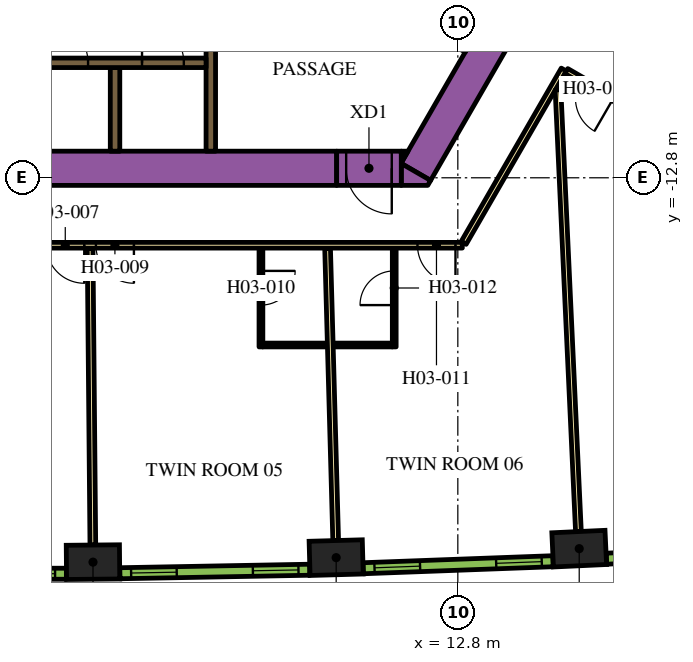
"""IFC4 building model, lengths in metres.
Left out: names, types, materials, properties, quantities, classifications, styles, units other than length and angle.
Written with IfcOpenShell. Run it as: python <this file> out.ifc"""

import sys

from ifc_helpers import new_model, si_unit, direction, frame, frame_2d, origin, origin_2d, place, context, subcontext, project, spatial, polyline, rectangle, outline, extrude, element, fill, save


model = new_model("IFC4")
c1 = context("Model", 3, precision=1e-05, world=origin(), true_north=direction((0.0, 1.0)))
c2 = subcontext(c1, "Body", "Model", "MODEL_VIEW")
j1 = project(units=[si_unit("LENGTHUNIT", "METRE"), si_unit("PLANEANGLEUNIT", "RADIAN")], contexts=[c1])
p1 = place(None, origin())
s1 = spatial("IfcSite", under=j1, at=p1, CompositionType="ELEMENT")
p2 = place(p1, origin())
s2 = spatial("IfcBuilding", under=s1, at=p2, CompositionType="ELEMENT")
p3 = place(p2, frame((0.0, 0.0, 54.9)))
s3 = spatial("IfcBuildingStorey", under=s2, at=p3, CompositionType="ELEMENT", Elevation=54.9)
for number, where, z_axis, x_axis in (
    (1, (3.2, -22.913, 0.0), (0.0, 0.0, 1.0), (1.0, 0.009, 0.0)),
    (2, (9.599, -22.795, 0.0), (0.0, 0.0, 1.0), (1.0, 0.028, 0.0)),
    (3, (15.994, -22.558, 0.0), (0.0, 0.0, 1.0), (0.999, 0.046, 0.0)),
):
    element("IfcColumn", number, at=place(p3, frame(where, z_axis=z_axis, x_axis=x_axis)), inside=s3, PredefinedType="COLUMN", context=c2, shape_type="SweptSolid", body=[
        extrude(rectangle(XDim=1.4, YDim=0.9, at=origin_2d()), origin(), (0.0, 0.0, 1.0), 3.9),
    ])
p4 = place(p3, frame((11.695, -12.644, 0.0), z_axis=(0.0, 0.0, 1.0), x_axis=(0.500010229568, 0.86601949766, 0.0)))
e4 = element("IfcWall", 4, at=p4, inside=s3, PredefinedType="SOLIDWALL", context=c2, shape_type="SweptSolid", body=[
    extrude(rectangle(XDim=9.326, YDim=0.9, at=frame_2d((4.663, 0.0))), origin(), (0.0, 0.0, 1.0), 3.9),
])
p5 = place(p3, origin())
e5 = element("IfcWall", 5, at=p5, inside=s3, PredefinedType="SOLIDWALL", context=c2, shape_type="SweptSolid", body=[
    extrude(outline(polyline([(12.009, -13.0), (11.312, -13.0), (11.312, -12.425), (12.083, -12.871), (12.009, -13.0)])), origin(), (0.0, 0.0, 1.0), 3.9),
])
e6 = element("IfcWall", 6, at=p5, inside=s3, PredefinedType="SOLIDWALL", context=c2, shape_type="SweptSolid", body=[
    extrude(outline(polyline([(11.489, -12.1), (11.312, -12.407), (11.312, -12.1), (11.489, -12.1)])), origin(), (0.0, 0.0, 1.0), 3.9),
])
p6 = place(p3, frame((-12.019, -12.55, 0.0), z_axis=(0.0, 0.0, 1.0), x_axis=(1.0, 0.0, 0.0)))
e7 = element("IfcWall", 7, at=p6, inside=s3, PredefinedType="SOLIDWALL", context=c2, shape_type="SweptSolid", body=[
    extrude(rectangle(XDim=21.63, YDim=0.9, at=frame_2d((10.815, 0.0))), origin(), (0.0, 0.0, 1.0), 3.9),
])
p7 = place(p3, frame((6.3, -8.67, 0.0), z_axis=(0.0, 0.0, 1.0), x_axis=(0.0, -1.0, 0.0)))
e8 = element("IfcWall", 8, at=p7, inside=s3, PredefinedType="SOLIDWALL", context=c2, shape_type="SweptSolid", body=[
    extrude(rectangle(XDim=3.43, YDim=0.25, at=frame_2d((1.715, 0.0))), origin(), (0.0, 0.0, 1.0), 3.9),
])
p8 = place(p3, frame((3.78, -12.1, 0.0), z_axis=(0.0, 0.0, 1.0), x_axis=(0.0, 1.0, 0.0)))
e9 = element("IfcWall", 9, at=p8, inside=s3, PredefinedType="SOLIDWALL", context=c2, shape_type="SweptSolid", body=[
    extrude(rectangle(XDim=2.2, YDim=0.25, at=frame_2d((1.1, 0.0))), origin(), (0.0, 0.0, 1.0), 3.9),
])
p9 = place(p3, frame((-6.175, -9.775, 0.0), z_axis=(0.0, 0.0, 1.0), x_axis=(1.0, 0.0, 0.0)))
e10 = element("IfcWall", 10, at=p9, inside=s3, PredefinedType="SOLIDWALL", context=c2, shape_type="SweptSolid", body=[
    extrude(rectangle(XDim=12.35, YDim=0.25, at=frame_2d((6.175, 0.0))), origin(), (0.0, 0.0, 1.0), 3.9),
])
p10 = place(p9, frame((0.585, 0.0, 0.0)))
e11 = element("IfcOpeningElement", 11, at=p10, cuts=e10, PredefinedType="OPENING", context=c2, shape_type="SweptSolid", body=[
    extrude(rectangle(XDim=1.1, YDim=2.1, at=frame_2d((0.55, 1.05))), frame((0.0, 0.135, 0.0), z_axis=(0.0, -1.0, 0.0), x_axis=(1.0, 0.0, 0.0)), (0.0, 0.0, 1.0), 0.27),
])
p11 = place(p9, frame((3.105, 0.0, 0.0)))
e12 = element("IfcOpeningElement", 12, at=p11, cuts=e10, PredefinedType="OPENING", context=c2, shape_type="SweptSolid", body=[
    extrude(rectangle(XDim=1.1, YDim=2.1, at=frame_2d((0.55, 1.05))), frame((0.0, 0.135, 0.0), z_axis=(0.0, -1.0, 0.0), x_axis=(1.0, 0.0, 0.0)), (0.0, 0.0, 1.0), 0.27),
])
p12 = place(p9, frame((5.625, 0.0, 0.0)))
e13 = element("IfcOpeningElement", 13, at=p12, cuts=e10, PredefinedType="OPENING", context=c2, shape_type="SweptSolid", body=[
    extrude(rectangle(XDim=1.1, YDim=2.1, at=frame_2d((0.55, 1.05))), frame((0.0, 0.135, 0.0), z_axis=(0.0, -1.0, 0.0), x_axis=(1.0, 0.0, 0.0)), (0.0, 0.0, 1.0), 0.27),
])
p13 = place(p9, frame((8.145, 0.0, 0.0)))
e14 = element("IfcOpeningElement", 14, at=p13, cuts=e10, PredefinedType="OPENING", context=c2, shape_type="SweptSolid", body=[
    extrude(rectangle(XDim=1.1, YDim=2.1, at=frame_2d((0.55, 1.05))), frame((0.0, 0.135, 0.0), z_axis=(0.0, -1.0, 0.0), x_axis=(1.0, 0.0, 0.0)), (0.0, 0.0, 1.0), 0.27),
])
p14 = place(p9, frame((10.665, 0.0, 0.0)))
e15 = element("IfcOpeningElement", 15, at=p14, cuts=e10, PredefinedType="OPENING", context=c2, shape_type="SweptSolid", body=[
    extrude(rectangle(XDim=1.1, YDim=2.1, at=frame_2d((0.55, 1.05))), frame((0.0, 0.135, 0.0), z_axis=(0.0, -1.0, 0.0), x_axis=(1.0, 0.0, 0.0)), (0.0, 0.0, 1.0), 0.27),
])
p15 = place(p3, frame((11.312, -12.55, 0.0), z_axis=(0.0, 0.0, 1.0), x_axis=(-1.0, 0.0, 0.0)))
e16 = element("IfcWall", 16, at=p15, inside=s3, PredefinedType="SOLIDWALL", context=c2, shape_type="SweptSolid", body=[
    extrude(rectangle(XDim=1.7, YDim=0.9, at=frame_2d((0.85, 0.0))), origin(), (0.0, 0.0, 1.0), 3.9),
])
p16 = place(p15, frame((0.25, 0.0, 0.0)))
e17 = element("IfcOpeningElement", 17, at=p16, cuts=e16, PredefinedType="OPENING", context=c2, shape_type="SweptSolid", body=[
    extrude(rectangle(XDim=1.2, YDim=2.1, at=frame_2d((0.6, 1.05))), frame((0.0, 0.46, 0.0), z_axis=(0.0, -1.0, 0.0), x_axis=(1.0, 0.0, 0.0)), (0.0, 0.0, 1.0), 0.92),
])
p17 = place(p3, frame((16.412, -8.523, 0.0), z_axis=(0.0, 0.0, 1.0), x_axis=(0.866022197818, -0.500005552856, 0.0)))
e18 = element("IfcWall", 18, at=p17, inside=s3, PredefinedType="PARTITIONING", context=c2, shape_type="SweptSolid", body=[
    extrude(rectangle(XDim=16.224, YDim=0.15, at=frame_2d((8.112, 0.0))), origin(), (0.0, 0.0, 1.0), 2.75),
])
p18 = place(p17, frame((7.949, 0.0, 0.0)))
e19 = element("IfcOpeningElement", 19, at=p18, cuts=e18, PredefinedType="OPENING", context=c2, shape_type="SweptSolid", body=[
    extrude(rectangle(XDim=1.0, YDim=2.1, at=frame_2d((0.5, 1.05))), frame((0.0, 0.085, 0.0), z_axis=(0.0, -1.0, 0.0), x_axis=(1.0, 0.0, 0.0)), (0.0, 0.0, 1.0), 0.17),
])
p19 = place(p17, frame((0.526, 0.0, 0.0)))
e20 = element("IfcOpeningElement", 20, at=p19, cuts=e18, PredefinedType="OPENING", context=c2, shape_type="SweptSolid", body=[
    extrude(rectangle(XDim=1.0, YDim=2.1, at=frame_2d((0.5, 1.05))), frame((0.0, 0.085, 0.0), z_axis=(0.0, -1.0, 0.0), x_axis=(1.0, 0.0, 0.0)), (0.0, 0.0, 1.0), 0.17),
])
p20 = place(p3, frame((12.918, -14.575, 0.0), z_axis=(0.0, 0.0, 1.0), x_axis=(-1.0, 0.0, 0.0)))
e21 = element("IfcWall", 21, at=p20, inside=s3, PredefinedType="PARTITIONING", context=c2, shape_type="SweptSolid", body=[
    extrude(rectangle(XDim=25.766, YDim=0.15, at=frame_2d((12.883, 0.0))), origin(), (0.0, 0.0, 1.0), 2.75),
])
p21 = place(p20, frame((24.586, 0.0, 0.0)))
e22 = element("IfcOpeningElement", 22, at=p21, cuts=e21, PredefinedType="OPENING", context=c2, shape_type="SweptSolid", body=[
    extrude(rectangle(XDim=1.0, YDim=2.1, at=frame_2d((0.5, 1.05))), frame((0.0, 0.085, 0.0), z_axis=(0.0, -1.0, 0.0), x_axis=(1.0, 0.0, 0.0)), (0.0, 0.0, 1.0), 0.17),
])
p22 = place(p20, frame((9.948, 0.0, 0.0)))
e23 = element("IfcOpeningElement", 23, at=p22, cuts=e21, PredefinedType="OPENING", context=c2, shape_type="SweptSolid", body=[
    extrude(rectangle(XDim=1.0, YDim=2.1, at=frame_2d((0.5, 1.05))), frame((0.0, 0.085, 0.0), z_axis=(0.0, -1.0, 0.0), x_axis=(1.0, 0.0, 0.0)), (0.0, 0.0, 1.0), 0.17),
])
p23 = place(p20, frame((8.642, 0.0, 0.0)))
e24 = element("IfcOpeningElement", 24, at=p23, cuts=e21, PredefinedType="OPENING", context=c2, shape_type="SweptSolid", body=[
    extrude(rectangle(XDim=1.0, YDim=2.1, at=frame_2d((0.5, 1.05))), frame((0.0, 0.085, 0.0), z_axis=(0.0, -1.0, 0.0), x_axis=(1.0, 0.0, 0.0)), (0.0, 0.0, 1.0), 0.17),
])
p24 = place(p20, frame((0.18, 0.0, 0.0)))
e25 = element("IfcOpeningElement", 25, at=p24, cuts=e21, PredefinedType="OPENING", context=c2, shape_type="SweptSolid", body=[
    extrude(rectangle(XDim=1.0, YDim=2.1, at=frame_2d((0.5, 1.05))), frame((0.0, 0.085, 0.0), z_axis=(0.0, -1.0, 0.0), x_axis=(1.0, 0.0, 0.0)), (0.0, 0.0, 1.0), 0.17),
])
p25 = place(p3, frame((15.587, -9.952, 0.0), z_axis=(0.0, 0.0, 1.0), x_axis=(-0.500016618951, -0.866015808616, 0.0)))
e26 = element("IfcWall", 26, at=p25, inside=s3, PredefinedType="PARTITIONING", context=c2, shape_type="SweptSolid", body=[
    extrude(rectangle(XDim=5.268, YDim=0.15, at=frame_2d((2.634, 0.0))), origin(), (0.0, 0.0, 1.0), 2.75),
])
p26 = place(p3, frame((29.638, -18.064, 0.0), z_axis=(0.0, 0.0, 1.0), x_axis=(-0.866026175601, 0.499998663172, 0.0)))
e27 = element("IfcWall", 27, at=p26, inside=s3, PredefinedType="PARTITIONING", context=c2, shape_type="SweptSolid", body=[
    extrude(rectangle(XDim=16.144, YDim=0.15, at=frame_2d((8.072, 0.0))), origin(), (0.0, 0.0, 1.0), 2.75),
])
p27 = place(p26, frame((14.714, 0.0, 0.0)))
e28 = element("IfcOpeningElement", 28, at=p27, cuts=e27, PredefinedType="OPENING", context=c2, shape_type="SweptSolid", body=[
    extrude(rectangle(XDim=1.0, YDim=2.1, at=frame_2d((0.5, 1.05))), frame((0.0, 0.085, 0.0), z_axis=(0.0, -1.0, 0.0), x_axis=(1.0, 0.0, 0.0)), (0.0, 0.0, 1.0), 0.17),
])
p28 = place(p26, frame((7.275, 0.0, 0.0)))
e29 = element("IfcOpeningElement", 29, at=p28, cuts=e27, PredefinedType="OPENING", context=c2, shape_type="SweptSolid", body=[
    extrude(rectangle(XDim=1.0, YDim=2.1, at=frame_2d((0.5, 1.05))), frame((0.0, 0.085, 0.0), z_axis=(0.0, -1.0, 0.0), x_axis=(1.0, 0.0, 0.0)), (0.0, 0.0, 1.0), 0.17),
])
p29 = place(p3, frame((3.196, -22.463, 0.0), z_axis=(0.0, 0.0, 1.0), x_axis=(-0.00926060032, 0.999957119721, 0.0)))
e30 = element("IfcWall", 30, at=p29, inside=s3, PredefinedType="PARTITIONING", context=c2, shape_type="SweptSolid", body=[
    extrude(rectangle(XDim=7.803, YDim=0.15, at=frame_2d((3.902, 0.0))), origin(), (0.0, 0.0, 1.0), 2.75),
])
p30 = place(p3, frame((9.586, -22.345, 0.0), z_axis=(0.0, 0.0, 1.0), x_axis=(-0.027722115646, 0.999615668297, 0.0)))
e31 = element("IfcWall", 31, at=p30, inside=s3, PredefinedType="PARTITIONING", context=c2, shape_type="SweptSolid", body=[
    extrude(rectangle(XDim=7.688, YDim=0.15, at=frame_2d((3.844, 0.0))), origin(), (0.0, 0.0, 1.0), 2.75),
])
p31 = place(p3, frame((15.973, -22.109, 0.0), z_axis=(0.0, 0.0, 1.0), x_axis=(-0.046191717129, 0.998932592955, 0.0)))
e32 = element("IfcWall", 32, at=p31, inside=s3, PredefinedType="PARTITIONING", context=c2, shape_type="SweptSolid", body=[
    extrude(rectangle(XDim=11.638, YDim=0.15, at=frame_2d((5.819, 0.0))), origin(), (0.0, 0.0, 1.0), 2.75),
])
p32 = place(p3, frame((7.619, -14.65, 0.0), z_axis=(0.0, 0.0, 1.0), x_axis=(0.0, -1.0, 0.0)))
e33 = element("IfcWall", 33, at=p32, inside=s3, PredefinedType="PARTITIONING", context=c2, shape_type="SweptSolid", body=[
    extrude(rectangle(XDim=2.6, YDim=0.1, at=frame_2d((1.3, 0.0))), origin(), (0.0, 0.0, 1.0), 2.75),
])
p33 = place(p32, frame((0.6, 0.0, 0.0)))
e34 = element("IfcOpeningElement", 34, at=p33, cuts=e33, PredefinedType="OPENING", context=c2, shape_type="SweptSolid", body=[
    extrude(rectangle(XDim=0.9, YDim=2.1, at=frame_2d((0.45, 1.05))), frame((0.0, 0.06, 0.0), z_axis=(0.0, -1.0, 0.0), x_axis=(1.0, 0.0, 0.0)), (0.0, 0.0, 1.0), 0.12),
])
p34 = place(p3, frame((7.669, -17.2, 0.0), z_axis=(0.0, 0.0, 1.0), x_axis=(1.0, 0.0, 0.0)))
e35 = element("IfcWall", 35, at=p34, inside=s3, PredefinedType="PARTITIONING", context=c2, shape_type="SweptSolid", body=[
    extrude(rectangle(XDim=1.69, YDim=0.1, at=frame_2d((0.845, 0.0))), origin(), (0.0, 0.0, 1.0), 2.75),
])
p35 = place(p3, frame((11.127, -17.25, 0.0), z_axis=(0.0, 0.0, 1.0), x_axis=(0.0, 1.0, 0.0)))
e36 = element("IfcWall", 36, at=p35, inside=s3, PredefinedType="PARTITIONING", context=c2, shape_type="SweptSolid", body=[
    extrude(rectangle(XDim=2.6, YDim=0.1, at=frame_2d((1.3, 0.0))), origin(), (0.0, 0.0, 1.0), 2.75),
])
p36 = place(p35, frame((1.1, 0.0, 0.0)))
e37 = element("IfcOpeningElement", 37, at=p36, cuts=e36, PredefinedType="OPENING", context=c2, shape_type="SweptSolid", body=[
    extrude(rectangle(XDim=0.9, YDim=2.1, at=frame_2d((0.45, 1.05))), frame((0.0, 0.06, 0.0), z_axis=(0.0, -1.0, 0.0), x_axis=(1.0, 0.0, 0.0)), (0.0, 0.0, 1.0), 0.12),
])
p37 = place(p3, frame((11.077, -17.2, 0.0), z_axis=(0.0, 0.0, 1.0), x_axis=(-1.0, 0.0, 0.0)))
e38 = element("IfcWall", 38, at=p37, inside=s3, PredefinedType="PARTITIONING", context=c2, shape_type="SweptSolid", body=[
    extrude(rectangle(XDim=1.55, YDim=0.1, at=frame_2d((0.775, 0.0))), origin(), (0.0, 0.0, 1.0), 2.75),
])
p38 = place(p3, frame((-2.499, -23.218, 0.0), z_axis=(0.0, 0.0, 1.0), x_axis=(1.0, 0.0, 0.0)))
e39 = element("IfcWall", 39, at=p38, inside=s3, PredefinedType="SOLIDWALL", context=c2, shape_type="SweptSolid", body=[
    extrude(rectangle(XDim=4.998, YDim=0.29, at=frame_2d((2.499, 0.0))), origin(), (0.0, 0.0, 1.0), 3.65),
])
p39 = place(p38, frame((0.297, 0.0, 0.9)))
e40 = element("IfcOpeningElement", 40, at=p39, cuts=e39, PredefinedType="OPENING", context=c2, shape_type="SweptSolid", body=[
    extrude(rectangle(XDim=1.2, YDim=2.15, at=frame_2d((0.6, 1.075))), frame((0.0, 0.155, 0.0), z_axis=(0.0, -1.0, 0.0), x_axis=(1.0, 0.0, 0.0)), (0.0, 0.0, 1.0), 0.31),
])
p40 = place(p38, frame((3.501, 0.0, 0.9)))
e41 = element("IfcOpeningElement", 41, at=p40, cuts=e39, PredefinedType="OPENING", context=c2, shape_type="SweptSolid", body=[
    extrude(rectangle(XDim=1.2, YDim=2.15, at=frame_2d((0.6, 1.075))), frame((0.0, 0.155, 0.0), z_axis=(0.0, -1.0, 0.0), x_axis=(1.0, 0.0, 0.0)), (0.0, 0.0, 1.0), 0.31),
])
p41 = place(p3, frame((3.906, -23.205, 0.0), z_axis=(0.0, 0.0, 1.0), x_axis=(0.999829529479, 0.018463801951, 0.0)))
e42 = element("IfcWall", 42, at=p41, inside=s3, PredefinedType="SOLIDWALL", context=c2, shape_type="SweptSolid", body=[
    extrude(rectangle(XDim=4.998, YDim=0.29, at=frame_2d((2.499, 0.0))), origin(), (0.0, 0.0, 1.0), 3.65),
])
p42 = place(p41, frame((0.297, 0.0, 0.9)))
e43 = element("IfcOpeningElement", 43, at=p42, cuts=e42, PredefinedType="OPENING", context=c2, shape_type="SweptSolid", body=[
    extrude(rectangle(XDim=1.2, YDim=2.15, at=frame_2d((0.6, 1.075))), frame((0.0, 0.155, 0.0), z_axis=(0.0, -1.0, 0.0), x_axis=(1.0, 0.0, 0.0)), (0.0, 0.0, 1.0), 0.31),
])
p43 = place(p41, frame((3.501, 0.0, 0.9)))
e44 = element("IfcOpeningElement", 44, at=p43, cuts=e42, PredefinedType="OPENING", context=c2, shape_type="SweptSolid", body=[
    extrude(rectangle(XDim=1.2, YDim=2.15, at=frame_2d((0.6, 1.075))), frame((0.0, 0.155, 0.0), z_axis=(0.0, -1.0, 0.0), x_axis=(1.0, 0.0, 0.0)), (0.0, 0.0, 1.0), 0.31),
])
p44 = place(p3, frame((10.31, -23.074, 0.0), z_axis=(0.0, 0.0, 1.0), x_axis=(0.999317974969, 0.036926750529, 0.0)))
e45 = element("IfcWall", 45, at=p44, inside=s3, PredefinedType="SOLIDWALL", context=c2, shape_type="SweptSolid", body=[
    extrude(rectangle(XDim=4.998, YDim=0.29, at=frame_2d((2.499, 0.0))), origin(), (0.0, 0.0, 1.0), 3.65),
])
p45 = place(p44, frame((0.297, 0.0, 0.9)))
e46 = element("IfcOpeningElement", 46, at=p45, cuts=e45, PredefinedType="OPENING", context=c2, shape_type="SweptSolid", body=[
    extrude(rectangle(XDim=1.2, YDim=2.15, at=frame_2d((0.6, 1.075))), frame((0.0, 0.155, 0.0), z_axis=(0.0, -1.0, 0.0), x_axis=(1.0, 0.0, 0.0)), (0.0, 0.0, 1.0), 0.31),
])
p46 = place(p44, frame((3.501, 0.0, 0.9)))
e47 = element("IfcOpeningElement", 47, at=p46, cuts=e45, PredefinedType="OPENING", context=c2, shape_type="SweptSolid", body=[
    extrude(rectangle(XDim=1.2, YDim=2.15, at=frame_2d((0.6, 1.075))), frame((0.0, 0.155, 0.0), z_axis=(0.0, -1.0, 0.0), x_axis=(1.0, 0.0, 0.0)), (0.0, 0.0, 1.0), 0.31),
])
p47 = place(p3, frame((16.711, -22.824, 0.0), z_axis=(0.0, 0.0, 1.0), x_axis=(0.998464708705, 0.055391564976, 0.0)))
e48 = element("IfcWall", 48, at=p47, inside=s3, PredefinedType="SOLIDWALL", context=c2, shape_type="SweptSolid", body=[
    extrude(rectangle(XDim=4.998, YDim=0.29, at=frame_2d((2.499, 0.0))), origin(), (0.0, 0.0, 1.0), 3.65),
])
p48 = place(p47, frame((0.297, 0.0, 0.9)))
e49 = element("IfcOpeningElement", 49, at=p48, cuts=e48, PredefinedType="OPENING", context=c2, shape_type="SweptSolid", body=[
    extrude(rectangle(XDim=1.2, YDim=2.15, at=frame_2d((0.6, 1.075))), frame((0.0, 0.155, 0.0), z_axis=(0.0, -1.0, 0.0), x_axis=(1.0, 0.0, 0.0)), (0.0, 0.0, 1.0), 0.31),
])
p49 = place(p47, frame((3.501, 0.0, 0.9)))
e50 = element("IfcOpeningElement", 50, at=p49, cuts=e48, PredefinedType="OPENING", context=c2, shape_type="SweptSolid", body=[
    extrude(rectangle(XDim=1.2, YDim=2.15, at=frame_2d((0.6, 1.075))), frame((0.0, 0.155, 0.0), z_axis=(0.0, -1.0, 0.0), x_axis=(1.0, 0.0, 0.0)), (0.0, 0.0, 1.0), 0.31),
])
p50 = place(p13, origin())
e51 = element("IfcDoor", 51, at=p50, inside=s3, OperationType="DOUBLE_DOOR_SLIDING", PredefinedType="DOOR", context=c2, shape_type="SweptSolid", body=[
    extrude(rectangle(XDim=1.1, YDim=2.1, at=frame_2d((0.55, 1.05))), frame((0.0, 0.025, 0.0), z_axis=(0.0, -1.0, 0.0), x_axis=(1.0, 0.0, 0.0)), (0.0, 0.0, 1.0), 0.05),
])
fill(e14, e51)
p51 = place(p14, origin())
e52 = element("IfcDoor", 52, at=p51, inside=s3, OperationType="DOUBLE_DOOR_SLIDING", PredefinedType="DOOR", context=c2, shape_type="SweptSolid", body=[
    extrude(rectangle(XDim=1.1, YDim=2.1, at=frame_2d((0.55, 1.05))), frame((0.0, 0.025, 0.0), z_axis=(0.0, -1.0, 0.0), x_axis=(1.0, 0.0, 0.0)), (0.0, 0.0, 1.0), 0.05),
])
fill(e15, e52)
p52 = place(p16, origin())
e53 = element("IfcDoor", 53, at=p52, inside=s3, OperationType="SINGLE_SWING_LEFT", PredefinedType="DOOR", context=c2, shape_type="SweptSolid", body=[
    extrude(rectangle(XDim=1.2, YDim=2.1, at=frame_2d((0.6, 1.05))), frame((0.0, 0.025, 0.0), z_axis=(0.0, -1.0, 0.0), x_axis=(1.0, 0.0, 0.0)), (0.0, 0.0, 1.0), 0.05),
])
fill(e17, e53)
p53 = place(p22, origin())
e54 = element("IfcDoor", 54, at=p53, inside=s3, OperationType="SINGLE_SWING_LEFT", PredefinedType="DOOR", context=c2, shape_type="SweptSolid", body=[
    extrude(rectangle(XDim=1.0, YDim=2.1, at=frame_2d((0.5, 1.05))), frame((0.0, 0.025, 0.0), z_axis=(0.0, -1.0, 0.0), x_axis=(1.0, 0.0, 0.0)), (0.0, 0.0, 1.0), 0.05),
])
fill(e23, e54)
p54 = place(p23, origin())
e55 = element("IfcDoor", 55, at=p54, inside=s3, OperationType="SINGLE_SWING_RIGHT", PredefinedType="DOOR", context=c2, shape_type="SweptSolid", body=[
    extrude(rectangle(XDim=1.0, YDim=2.1, at=frame_2d((0.5, 1.05))), frame((0.0, 0.025, 0.0), z_axis=(0.0, -1.0, 0.0), x_axis=(1.0, 0.0, 0.0)), (0.0, 0.0, 1.0), 0.05),
])
fill(e24, e55)
p55 = place(p33, origin())
e56 = element("IfcDoor", 56, at=p55, inside=s3, OperationType="SINGLE_SWING_LEFT", PredefinedType="DOOR", context=c2, shape_type="SweptSolid", body=[
    extrude(rectangle(XDim=0.9, YDim=2.1, at=frame_2d((0.45, 1.05))), frame((0.0, 0.025, 0.0), z_axis=(0.0, -1.0, 0.0), x_axis=(1.0, 0.0, 0.0)), (0.0, 0.0, 1.0), 0.05),
])
fill(e34, e56)
p56 = place(p24, origin())
e57 = element("IfcDoor", 57, at=p56, inside=s3, OperationType="SINGLE_SWING_LEFT", PredefinedType="DOOR", context=c2, shape_type="SweptSolid", body=[
    extrude(rectangle(XDim=1.0, YDim=2.1, at=frame_2d((0.5, 1.05))), frame((0.0, 0.025, 0.0), z_axis=(0.0, -1.0, 0.0), x_axis=(1.0, 0.0, 0.0)), (0.0, 0.0, 1.0), 0.05),
])
fill(e25, e57)
p57 = place(p36, origin())
e58 = element("IfcDoor", 58, at=p57, inside=s3, OperationType="SINGLE_SWING_RIGHT", PredefinedType="DOOR", context=c2, shape_type="SweptSolid", body=[
    extrude(rectangle(XDim=0.9, YDim=2.1, at=frame_2d((0.45, 1.05))), frame((0.0, 0.025, 0.0), z_axis=(0.0, -1.0, 0.0), x_axis=(1.0, 0.0, 0.0)), (0.0, 0.0, 1.0), 0.05),
])
fill(e37, e58)
p58 = place(p27, origin())
e59 = element("IfcDoor", 59, at=p58, inside=s3, OperationType="SINGLE_SWING_RIGHT", PredefinedType="DOOR", context=c2, shape_type="SweptSolid", body=[
    extrude(rectangle(XDim=1.0, YDim=2.1, at=frame_2d((0.5, 1.05))), frame((0.0, 0.025, 0.0), z_axis=(0.0, -1.0, 0.0), x_axis=(1.0, 0.0, 0.0)), (0.0, 0.0, 1.0), 0.05),
])
fill(e28, e59)
p59 = place(p40, origin())
e60 = element("IfcWindow", 60, at=p59, inside=s3, PartitioningType="DOUBLE_PANEL_VERTICAL", PredefinedType="WINDOW", context=c2, shape_type="SweptSolid", body=[
    extrude(rectangle(XDim=1.2, YDim=2.15, at=frame_2d((0.6, 1.075))), frame((0.0, 0.015, 0.0), z_axis=(0.0, -1.0, 0.0), x_axis=(1.0, 0.0, 0.0)), (0.0, 0.0, 1.0), 0.06),
])
fill(e41, e60)
p60 = place(p42, origin())
e61 = element("IfcWindow", 61, at=p60, inside=s3, PartitioningType="DOUBLE_PANEL_VERTICAL", PredefinedType="WINDOW", context=c2, shape_type="SweptSolid", body=[
    extrude(rectangle(XDim=1.2, YDim=2.15, at=frame_2d((0.6, 1.075))), frame((0.0, 0.015, 0.0), z_axis=(0.0, -1.0, 0.0), x_axis=(1.0, 0.0, 0.0)), (0.0, 0.0, 1.0), 0.06),
])
fill(e43, e61)
p61 = place(p43, origin())
e62 = element("IfcWindow", 62, at=p61, inside=s3, PartitioningType="DOUBLE_PANEL_VERTICAL", PredefinedType="WINDOW", context=c2, shape_type="SweptSolid", body=[
    extrude(rectangle(XDim=1.2, YDim=2.15, at=frame_2d((0.6, 1.075))), frame((0.0, 0.015, 0.0), z_axis=(0.0, -1.0, 0.0), x_axis=(1.0, 0.0, 0.0)), (0.0, 0.0, 1.0), 0.06),
])
fill(e44, e62)
p62 = place(p45, origin())
e63 = element("IfcWindow", 63, at=p62, inside=s3, PartitioningType="DOUBLE_PANEL_VERTICAL", PredefinedType="WINDOW", context=c2, shape_type="SweptSolid", body=[
    extrude(rectangle(XDim=1.2, YDim=2.15, at=frame_2d((0.6, 1.075))), frame((0.0, 0.015, 0.0), z_axis=(0.0, -1.0, 0.0), x_axis=(1.0, 0.0, 0.0)), (0.0, 0.0, 1.0), 0.06),
])
fill(e46, e63)
p63 = place(p46, origin())
e64 = element("IfcWindow", 64, at=p63, inside=s3, PartitioningType="DOUBLE_PANEL_VERTICAL", PredefinedType="WINDOW", context=c2, shape_type="SweptSolid", body=[
    extrude(rectangle(XDim=1.2, YDim=2.15, at=frame_2d((0.6, 1.075))), frame((0.0, 0.015, 0.0), z_axis=(0.0, -1.0, 0.0), x_axis=(1.0, 0.0, 0.0)), (0.0, 0.0, 1.0), 0.06),
])
fill(e47, e64)
save(model, sys.argv[1])
